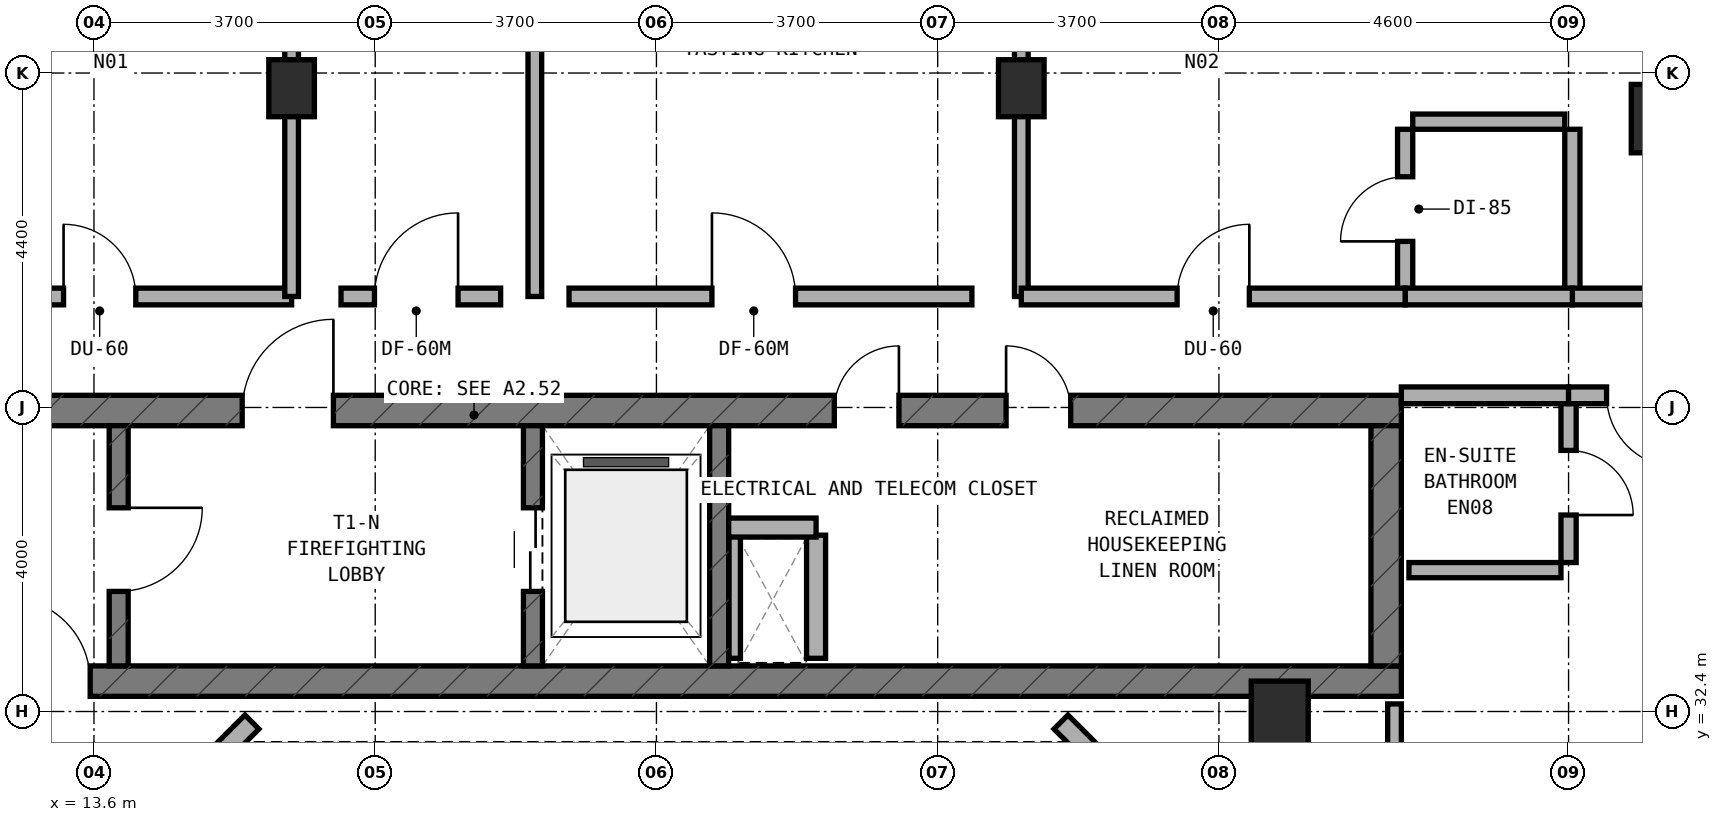
"""IFC4 building model, lengths in metres.
Left out: names, types, materials, properties, quantities, classifications, styles, units other than length and angle.
Written with IfcOpenShell. Run it as: python <this file> out.ifc"""

import sys

from ifc_helpers import new_model, si_unit, direction, frame, frame_2d, origin, origin_2d, place, context, subcontext, project, spatial, rectangle, extrude, element, fill, save


model = new_model("IFC4")
c1 = context("Model", 3, precision=1e-05, world=origin(), true_north=direction((0.0, 1.0)))
c2 = subcontext(c1, "Body", "Model", "MODEL_VIEW")
j1 = project(units=[si_unit("LENGTHUNIT", "METRE"), si_unit("PLANEANGLEUNIT", "RADIAN")], contexts=[c1])
p1 = place(None, origin())
s1 = spatial("IfcSite", under=j1, at=p1, CompositionType="ELEMENT")
p2 = place(p1, origin())
s2 = spatial("IfcBuilding", under=s1, at=p2, CompositionType="ELEMENT")
p3 = place(p2, frame((0.0, 0.0, 243.2)))
s3 = spatial("IfcBuildingStorey", under=s2, at=p3, CompositionType="ELEMENT", Elevation=243.2)
p4 = place(p3, frame((6.4, 32.8, 0.0), z_axis=(0.0, 0.0, 1.0), x_axis=(1.0, 0.0, 0.0)))
e1 = element("IfcWall", 1, at=p4, inside=s3, PredefinedType="SHEAR", context=c2, shape_type="SweptSolid", body=[
    extrude(rectangle(XDim=24.4, YDim=0.4, at=frame_2d((12.2, 0.0))), origin(), (0.0, 0.0, 1.0), 3.6),
])
p5 = place(p4, frame((6.05, 0.0, 0.0)))
e2 = element("IfcOpeningElement", 2, at=p5, cuts=e1, PredefinedType="OPENING", context=c2, shape_type="SweptSolid", body=[
    extrude(rectangle(XDim=1.1, YDim=2.15, at=frame_2d((0.55, 1.075))), frame((0.0, 0.21, 0.0), z_axis=(0.0, -1.0, 0.0), x_axis=(1.0, 0.0, 0.0)), (0.0, 0.0, 1.0), 0.42),
])
p6 = place(p3, frame((6.4, 36.36, 0.0), z_axis=(0.0, 0.0, 1.0), x_axis=(1.0, 0.0, 0.0)))
e3 = element("IfcWall", 3, at=p6, inside=s3, PredefinedType="SHEAR", context=c2, shape_type="SweptSolid", body=[
    extrude(rectangle(XDim=24.4, YDim=0.4, at=frame_2d((12.2, 0.0))), origin(), (0.0, 0.0, 1.0), 3.6),
])
p7 = place(p6, frame((9.15, 0.0, 0.0)))
e4 = element("IfcOpeningElement", 4, at=p7, cuts=e3, PredefinedType="OPENING", context=c2, shape_type="SweptSolid", body=[
    extrude(rectangle(XDim=1.2, YDim=2.15, at=frame_2d((0.6, 1.075))), frame((0.0, 0.21, 0.0), z_axis=(0.0, -1.0, 0.0), x_axis=(1.0, 0.0, 0.0)), (0.0, 0.0, 1.0), 0.42),
])
p8 = place(p6, frame((19.2, 0.0, 0.0)))
e5 = element("IfcOpeningElement", 5, at=p8, cuts=e3, PredefinedType="OPENING", context=c2, shape_type="SweptSolid", body=[
    extrude(rectangle(XDim=0.85, YDim=2.1, at=frame_2d((0.425, 1.05))), frame((0.0, 0.21, 0.0), z_axis=(0.0, -1.0, 0.0), x_axis=(1.0, 0.0, 0.0)), (0.0, 0.0, 1.0), 0.42),
])
p9 = place(p6, frame((16.94, 0.0, 0.0)))
e6 = element("IfcOpeningElement", 6, at=p9, cuts=e3, PredefinedType="OPENING", context=c2, shape_type="SweptSolid", body=[
    extrude(rectangle(XDim=0.85, YDim=2.1, at=frame_2d((0.425, 1.05))), frame((0.0, 0.21, 0.0), z_axis=(0.0, -1.0, 0.0), x_axis=(1.0, 0.0, 0.0)), (0.0, 0.0, 1.0), 0.42),
])
p10 = place(p3, frame((30.6, 33.0, 0.0), z_axis=(0.0, 0.0, 1.0), x_axis=(0.0, 1.0, 0.0)))
e7 = element("IfcWall", 7, at=p10, inside=s3, PredefinedType="SHEAR", context=c2, shape_type="SweptSolid", body=[
    extrude(rectangle(XDim=3.16, YDim=0.4, at=frame_2d((1.58, 0.0))), origin(), (0.0, 0.0, 1.0), 3.6),
])
p11 = place(p3, frame((13.925, 33.0, 0.0), z_axis=(0.0, 0.0, 1.0), x_axis=(0.0, 1.0, 0.0)))
e8 = element("IfcWall", 8, at=p11, inside=s3, PredefinedType="STANDARD", context=c2, shape_type="SweptSolid", body=[
    extrude(rectangle(XDim=3.16, YDim=0.25, at=frame_2d((1.58, 0.0))), origin(), (0.0, 0.0, 1.0), 3.32),
])
p12 = place(p11, frame((0.98, 0.0, 0.0)))
e9 = element("IfcOpeningElement", 9, at=p12, cuts=e8, PredefinedType="OPENING", context=c2, shape_type="SweptSolid", body=[
    extrude(rectangle(XDim=1.1, YDim=2.15, at=frame_2d((0.55, 1.075))), frame((0.0, 0.135, 0.0), z_axis=(0.0, -1.0, 0.0), x_axis=(1.0, 0.0, 0.0)), (0.0, 0.0, 1.0), 0.27),
])
p13 = place(p3, frame((19.375, 33.0, 0.0), z_axis=(0.0, 0.0, 1.0), x_axis=(0.0, 1.0, 0.0)))
e10 = element("IfcWall", 10, at=p13, inside=s3, PredefinedType="STANDARD", context=c2, shape_type="SweptSolid", body=[
    extrude(rectangle(XDim=3.16, YDim=0.25, at=frame_2d((1.58, 0.0))), origin(), (0.0, 0.0, 1.0), 3.32),
])
p14 = place(p13, frame((0.98, 0.0, 0.0)))
e11 = element("IfcOpeningElement", 11, at=p14, cuts=e10, PredefinedType="OPENING", context=c2, shape_type="SweptSolid", body=[
    extrude(rectangle(XDim=1.1, YDim=2.15, at=frame_2d((0.55, 1.075))), frame((0.0, 0.135, 0.0), z_axis=(0.0, -1.0, 0.0), x_axis=(1.0, 0.0, 0.0)), (0.0, 0.0, 1.0), 0.27),
])
p15 = place(p3, frame((21.825, 33.0, 0.0), z_axis=(0.0, 0.0, 1.0), x_axis=(0.0, 1.0, 0.0)))
e12 = element("IfcWall", 12, at=p15, inside=s3, PredefinedType="STANDARD", context=c2, shape_type="SweptSolid", body=[
    extrude(rectangle(XDim=3.16, YDim=0.25, at=frame_2d((1.58, 0.0))), origin(), (0.0, 0.0, 1.0), 3.32),
])
for number, where, z_axis, x_axis in (
    (13, (16.2, 40.6, 0.0), (0.0, 0.0, 1.0), (1.0, 0.0, 0.0)),
    (14, (25.8, 40.6, 0.0), (0.0, 0.0, 1.0), (1.0, 0.0, 0.0)),
):
    element("IfcColumn", number, at=place(p3, frame(where, z_axis=z_axis, x_axis=x_axis)), inside=s3, PredefinedType="COLUMN", context=c2, shape_type="SweptSolid", body=[
        extrude(rectangle(XDim=0.6, YDim=0.75, at=origin_2d()), origin(), (0.0, 0.0, 1.0), 3.6),
    ])
for number, where, z_axis, x_axis in (
    (15, (34.2, 40.2, 0.0), (0.0, 0.0, 1.0), (1.0, 0.0, 0.0)),
    (16, (29.2, 32.35, 0.0), (0.0, 0.0, 1.0), (1.0, 0.0, 0.0)),
):
    element("IfcColumn", number, at=place(p3, frame(where, z_axis=z_axis, x_axis=x_axis)), inside=s3, PredefinedType="COLUMN", context=c2, shape_type="SweptSolid", body=[
        extrude(rectangle(XDim=0.75, YDim=0.9, at=origin_2d()), origin(), (0.0, 0.0, 1.0), 3.6),
    ])
for number, where, z_axis, x_axis in (
    (17, (28.156, 30.428, 0.0), (0.0, 0.0, 1.0), (-0.707, 0.707, 0.0)),
    (18, (15.678, 32.262, 0.0), (0.0, 0.0, 1.0), (-0.707, -0.707, 0.0)),
):
    element("IfcWall", number, at=place(p3, frame(where, z_axis=z_axis, x_axis=x_axis)), inside=s3, PredefinedType="STANDARD", context=c2, shape_type="SweptSolid", body=[
        extrude(rectangle(XDim=2.594, YDim=0.26, at=frame_2d((1.297, 0.0))), origin(), (0.0, 0.0, 1.0), 3.32),
    ])
p16 = place(p3, frame((22.03, 33.1, 0.0), z_axis=(0.0, 0.0, 1.0), x_axis=(0.0, 1.0, 0.0)))
e19 = element("IfcWall", 19, at=p16, inside=s3, PredefinedType="PARTITIONING", context=c2, shape_type="SweptSolid", body=[
    extrude(rectangle(XDim=1.62, YDim=0.15, at=frame_2d((0.81, 0.0))), origin(), (0.0, 0.0, 1.0), 3.32),
])
p17 = place(p3, frame((23.1, 33.1, 0.0), z_axis=(0.0, 0.0, 1.0), x_axis=(0.0, 1.0, 0.0)))
e20 = element("IfcWall", 20, at=p17, inside=s3, PredefinedType="SOLIDWALL", context=c2, shape_type="SweptSolid", body=[
    extrude(rectangle(XDim=1.62, YDim=0.25, at=frame_2d((0.81, 0.0))), origin(), (0.0, 0.0, 1.0), 3.32),
])
p18 = place(p3, frame((21.95, 34.82, 0.0), z_axis=(0.0, 0.0, 1.0), x_axis=(1.0, 0.0, 0.0)))
e21 = element("IfcWall", 21, at=p18, inside=s3, PredefinedType="SOLIDWALL", context=c2, shape_type="SweptSolid", body=[
    extrude(rectangle(XDim=1.15, YDim=0.25, at=frame_2d((0.575, 0.0))), origin(), (0.0, 0.0, 1.0), 3.32),
])
p19 = place(p3, frame((11.15, 37.86, 0.0), z_axis=(0.0, 0.0, 1.0), x_axis=(1.0, 0.0, 0.0)))
e22 = element("IfcWall", 22, at=p19, inside=s3, PredefinedType="SOLIDWALL", context=c2, shape_type="SweptSolid", body=[
    extrude(rectangle(XDim=5.05, YDim=0.22, at=frame_2d((2.525, 0.0))), origin(), (0.0, 0.0, 1.0), 2.745),
])
p20 = place(p19, frame((2.05, 0.0, 0.0)))
e23 = element("IfcOpeningElement", 23, at=p20, cuts=e22, PredefinedType="OPENING", context=c2, shape_type="SweptSolid", body=[
    extrude(rectangle(XDim=0.95, YDim=2.1, at=frame_2d((0.475, 1.05))), frame((0.0, 0.12, 0.0), z_axis=(0.0, -1.0, 0.0), x_axis=(1.0, 0.0, 0.0)), (0.0, 0.0, 1.0), 0.24),
])
p21 = place(p3, frame((16.2, 37.86, 0.0), z_axis=(0.0, 0.0, 1.0), x_axis=(0.0, 1.0, 0.0)))
e24 = element("IfcWall", 24, at=p21, inside=s3, PredefinedType="SOLIDWALL", context=c2, shape_type="SweptSolid", body=[
    extrude(rectangle(XDim=5.68, YDim=0.18, at=frame_2d((2.84, 0.0))), origin(), (0.0, 0.0, 1.0), 2.745),
])
p22 = place(p3, frame((19.4, 37.86, 0.0), z_axis=(0.0, 0.0, 1.0), x_axis=(0.0, 1.0, 0.0)))
e25 = element("IfcWall", 25, at=p22, inside=s3, PredefinedType="SOLIDWALL", context=c2, shape_type="SweptSolid", body=[
    extrude(rectangle(XDim=5.68, YDim=0.18, at=frame_2d((2.84, 0.0))), origin(), (0.0, 0.0, 1.0), 2.995),
])
p23 = place(p3, frame((16.85, 37.86, 0.0), z_axis=(0.0, 0.0, 1.0), x_axis=(1.0, 0.0, 0.0)))
e26 = element("IfcWall", 26, at=p23, inside=s3, PredefinedType="SOLIDWALL", context=c2, shape_type="SweptSolid", body=[
    extrude(rectangle(XDim=2.1, YDim=0.22, at=frame_2d((1.05, 0.0))), origin(), (0.0, 0.0, 1.0), 3.32),
])
p24 = place(p23, frame((0.44, 0.0, 0.0)))
e27 = element("IfcOpeningElement", 27, at=p24, cuts=e26, PredefinedType="OPENING", context=c2, shape_type="SweptSolid", body=[
    extrude(rectangle(XDim=1.1, YDim=2.1, at=frame_2d((0.55, 1.05))), frame((0.0, 0.12, 0.0), z_axis=(0.0, -1.0, 0.0), x_axis=(1.0, 0.0, 0.0)), (0.0, 0.0, 1.0), 0.24),
])
p25 = place(p3, frame((19.85, 37.86, 0.0), z_axis=(0.0, 0.0, 1.0), x_axis=(1.0, 0.0, 0.0)))
e28 = element("IfcWall", 28, at=p25, inside=s3, PredefinedType="SOLIDWALL", context=c2, shape_type="SweptSolid", body=[
    extrude(rectangle(XDim=5.3, YDim=0.22, at=frame_2d((2.65, 0.0))), origin(), (0.0, 0.0, 1.0), 3.32),
])
p26 = place(p25, frame((1.88, 0.0, 0.0)))
e29 = element("IfcOpeningElement", 29, at=p26, cuts=e28, PredefinedType="OPENING", context=c2, shape_type="SweptSolid", body=[
    extrude(rectangle(XDim=1.1, YDim=2.1, at=frame_2d((0.55, 1.05))), frame((0.0, 0.12, 0.0), z_axis=(0.0, -1.0, 0.0), x_axis=(1.0, 0.0, 0.0)), (0.0, 0.0, 1.0), 0.24),
])
p27 = place(p3, frame((25.8, 37.86, 0.0), z_axis=(0.0, 0.0, 1.0), x_axis=(0.0, 1.0, 0.0)))
e30 = element("IfcWall", 30, at=p27, inside=s3, PredefinedType="SOLIDWALL", context=c2, shape_type="SweptSolid", body=[
    extrude(rectangle(XDim=5.68, YDim=0.18, at=frame_2d((2.84, 0.0))), origin(), (0.0, 0.0, 1.0), 2.745),
])
p28 = place(p3, frame((30.85, 37.96, 0.0), z_axis=(0.0, 0.0, 1.0), x_axis=(0.0, 1.0, 0.0)))
e31 = element("IfcWall", 31, at=p28, inside=s3, PredefinedType="PLUMBINGWALL", context=c2, shape_type="SweptSolid", body=[
    extrude(rectangle(XDim=2.1, YDim=0.2, at=frame_2d((1.05, 0.0))), origin(), (0.0, 0.0, 1.0), 2.995),
])
p29 = place(p28, frame((0.625, 0.0, 0.0)))
e32 = element("IfcOpeningElement", 32, at=p29, cuts=e31, PredefinedType="OPENING", context=c2, shape_type="SweptSolid", body=[
    extrude(rectangle(XDim=0.85, YDim=2.1, at=frame_2d((0.425, 1.05))), frame((0.0, 0.11, 0.0), z_axis=(0.0, -1.0, 0.0), x_axis=(1.0, 0.0, 0.0)), (0.0, 0.0, 1.0), 0.22),
])
p30 = place(p3, frame((30.95, 40.16, 0.0), z_axis=(0.0, 0.0, 1.0), x_axis=(1.0, 0.0, 0.0)))
e33 = element("IfcWall", 33, at=p30, inside=s3, PredefinedType="PLUMBINGWALL", context=c2, shape_type="SweptSolid", body=[
    extrude(rectangle(XDim=2.0, YDim=0.2, at=frame_2d((1.0, 0.0))), origin(), (0.0, 0.0, 1.0), 3.015),
])
p31 = place(p3, frame((33.05, 37.96, 0.0), z_axis=(0.0, 0.0, 1.0), x_axis=(0.0, 1.0, 0.0)))
e34 = element("IfcWall", 34, at=p31, inside=s3, PredefinedType="PLUMBINGWALL", context=c2, shape_type="SweptSolid", body=[
    extrude(rectangle(XDim=2.1, YDim=0.2, at=frame_2d((1.05, 0.0))), origin(), (0.0, 0.0, 1.0), 2.995),
])
p32 = place(p3, frame((33.05, 37.86, 0.0), z_axis=(0.0, 0.0, 1.0), x_axis=(1.0, 0.0, 0.0)))
e35 = element("IfcWall", 35, at=p32, inside=s3, PredefinedType="SOLIDWALL", context=c2, shape_type="SweptSolid", body=[
    extrude(rectangle(XDim=6.19, YDim=0.22, at=frame_2d((3.095, 0.0))), origin(), (0.0, 0.0, 1.0), 2.745),
])
p33 = place(p3, frame((30.85, 37.86, 0.0), z_axis=(0.0, 0.0, 1.0), x_axis=(1.0, 0.0, 0.0)))
e36 = element("IfcWall", 36, at=p33, inside=s3, PredefinedType="SOLIDWALL", context=c2, shape_type="SweptSolid", body=[
    extrude(rectangle(XDim=2.2, YDim=0.22, at=frame_2d((1.1, 0.0))), origin(), (0.0, 0.0, 1.0), 3.32),
])
p34 = place(p3, frame((25.8, 37.86, 0.0), z_axis=(0.0, 0.0, 1.0), x_axis=(1.0, 0.0, 0.0)))
e37 = element("IfcWall", 37, at=p34, inside=s3, PredefinedType="SOLIDWALL", context=c2, shape_type="SweptSolid", body=[
    extrude(rectangle(XDim=5.05, YDim=0.22, at=frame_2d((2.525, 0.0))), origin(), (0.0, 0.0, 1.0), 2.745),
])
p35 = place(p34, frame((2.05, 0.0, 0.0)))
e38 = element("IfcOpeningElement", 38, at=p35, cuts=e37, PredefinedType="OPENING", context=c2, shape_type="SweptSolid", body=[
    extrude(rectangle(XDim=0.95, YDim=2.1, at=frame_2d((0.475, 1.05))), frame((0.0, 0.12, 0.0), z_axis=(0.0, -1.0, 0.0), x_axis=(1.0, 0.0, 0.0)), (0.0, 0.0, 1.0), 0.24),
])
p36 = place(p3, frame((30.71, 17.5, 0.0), z_axis=(0.0, 0.0, 1.0), x_axis=(0.0, 1.0, 0.0)))
e39 = element("IfcWall", 39, at=p36, inside=s3, PredefinedType="SOLIDWALL", context=c2, shape_type="SweptSolid", body=[
    extrude(rectangle(XDim=15.0, YDim=0.18, at=frame_2d((7.5, 0.0))), origin(), (0.0, 0.0, 1.0), 2.745),
])
p37 = place(p3, frame((33.0, 34.36, 0.0), z_axis=(0.0, 0.0, 1.0), x_axis=(0.0, 1.0, 0.0)))
e40 = element("IfcWall", 40, at=p37, inside=s3, PredefinedType="PLUMBINGWALL", context=c2, shape_type="SweptSolid", body=[
    extrude(rectangle(XDim=2.1, YDim=0.2, at=frame_2d((1.05, 0.0))), origin(), (0.0, 0.0, 1.0), 3.32),
])
p38 = place(p37, frame((0.625, 0.0, 0.0)))
e41 = element("IfcOpeningElement", 41, at=p38, cuts=e40, PredefinedType="OPENING", context=c2, shape_type="SweptSolid", body=[
    extrude(rectangle(XDim=0.85, YDim=2.1, at=frame_2d((0.425, 1.05))), frame((0.0, 0.11, 0.0), z_axis=(0.0, -1.0, 0.0), x_axis=(1.0, 0.0, 0.0)), (0.0, 0.0, 1.0), 0.22),
])
p39 = place(p3, frame((30.9, 34.26, 0.0), z_axis=(0.0, 0.0, 1.0), x_axis=(1.0, 0.0, 0.0)))
e42 = element("IfcWall", 42, at=p39, inside=s3, PredefinedType="PLUMBINGWALL", context=c2, shape_type="SweptSolid", body=[
    extrude(rectangle(XDim=2.0, YDim=0.2, at=frame_2d((1.0, 0.0))), origin(), (0.0, 0.0, 1.0), 3.32),
])
p40 = place(p3, frame((30.8, 36.56, 0.0), z_axis=(0.0, 0.0, 1.0), x_axis=(1.0, 0.0, 0.0)))
e43 = element("IfcWall", 43, at=p40, inside=s3, PredefinedType="SOLIDWALL", context=c2, shape_type="SweptSolid", body=[
    extrude(rectangle(XDim=2.2, YDim=0.22, at=frame_2d((1.1, 0.0))), origin(), (0.0, 0.0, 1.0), 3.32),
])
p41 = place(p3, frame((33.0, 36.56, 0.0), z_axis=(0.0, 0.0, 1.0), x_axis=(1.0, 0.0, 0.0)))
e44 = element("IfcWall", 44, at=p41, inside=s3, PredefinedType="SOLIDWALL", context=c2, shape_type="SweptSolid", body=[
    extrude(rectangle(XDim=6.4, YDim=0.22, at=frame_2d((3.2, 0.0))), origin(), (0.0, 0.0, 1.0), 2.745),
])
p42 = place(p41, frame((0.5, 0.0, 0.0)))
e45 = element("IfcOpeningElement", 45, at=p42, cuts=e44, PredefinedType="OPENING", context=c2, shape_type="SweptSolid", body=[
    extrude(rectangle(XDim=0.95, YDim=2.1, at=frame_2d((0.475, 1.05))), frame((0.0, 0.12, 0.0), z_axis=(0.0, -1.0, 0.0), x_axis=(1.0, 0.0, 0.0)), (0.0, 0.0, 1.0), 0.24),
])
p43 = place(p12, frame((1.1, 0.0, 0.0), z_axis=(0.0, 0.0, 1.0), x_axis=(-1.0, 0.0, 0.0)))
e46 = element("IfcDoor", 46, at=p43, inside=s3, OperationType="SINGLE_SWING_LEFT", PredefinedType="DOOR", context=c2, shape_type="SweptSolid", body=[
    extrude(rectangle(XDim=1.1, YDim=2.15, at=frame_2d((0.55, 1.075))), frame((0.0, 0.025, 0.0), z_axis=(0.0, -1.0, 0.0), x_axis=(1.0, 0.0, 0.0)), (0.0, 0.0, 1.0), 0.05),
])
fill(e9, e46)
p44 = place(p7, origin())
e47 = element("IfcDoor", 47, at=p44, inside=s3, OperationType="SINGLE_SWING_RIGHT", PredefinedType="DOOR", context=c2, shape_type="SweptSolid", body=[
    extrude(rectangle(XDim=1.2, YDim=2.15, at=frame_2d((0.6, 1.075))), frame((0.0, 0.025, 0.0), z_axis=(0.0, -1.0, 0.0), x_axis=(1.0, 0.0, 0.0)), (0.0, 0.0, 1.0), 0.05),
])
fill(e4, e47)
p45 = place(p14, origin())
e48 = element("IfcDoor", 48, at=p45, inside=s3, OperationType="DOUBLE_DOOR_SLIDING", PredefinedType="DOOR", context=c2, shape_type="SweptSolid", body=[
    extrude(rectangle(XDim=1.1, YDim=2.15, at=frame_2d((0.55, 1.075))), frame((0.0, 0.025, 0.0), z_axis=(0.0, -1.0, 0.0), x_axis=(1.0, 0.0, 0.0)), (0.0, 0.0, 1.0), 0.05),
])
fill(e11, e48)
p46 = place(p8, origin())
e49 = element("IfcDoor", 49, at=p46, inside=s3, OperationType="SINGLE_SWING_LEFT", PredefinedType="DOOR", context=c2, shape_type="SweptSolid", body=[
    extrude(rectangle(XDim=0.85, YDim=2.1, at=frame_2d((0.425, 1.05))), frame((0.0, 0.025, 0.0), z_axis=(0.0, -1.0, 0.0), x_axis=(1.0, 0.0, 0.0)), (0.0, 0.0, 1.0), 0.05),
])
fill(e5, e49)
p47 = place(p9, origin())
e50 = element("IfcDoor", 50, at=p47, inside=s3, OperationType="SINGLE_SWING_RIGHT", PredefinedType="DOOR", context=c2, shape_type="SweptSolid", body=[
    extrude(rectangle(XDim=0.85, YDim=2.1, at=frame_2d((0.425, 1.05))), frame((0.0, 0.025, 0.0), z_axis=(0.0, -1.0, 0.0), x_axis=(1.0, 0.0, 0.0)), (0.0, 0.0, 1.0), 0.05),
])
fill(e6, e50)
p48 = place(p5, origin())
e51 = element("IfcDoor", 51, at=p48, inside=s3, OperationType="SINGLE_SWING_LEFT", PredefinedType="DOOR", context=c2, shape_type="SweptSolid", body=[
    extrude(rectangle(XDim=1.1, YDim=2.15, at=frame_2d((0.55, 1.075))), frame((0.0, 0.025, 0.0), z_axis=(0.0, -1.0, 0.0), x_axis=(1.0, 0.0, 0.0)), (0.0, 0.0, 1.0), 0.05),
])
fill(e2, e51)
p49 = place(p20, origin())
e52 = element("IfcDoor", 52, at=p49, inside=s3, OperationType="SINGLE_SWING_LEFT", PredefinedType="DOOR", context=c2, shape_type="SweptSolid", body=[
    extrude(rectangle(XDim=0.95, YDim=2.1, at=frame_2d((0.475, 1.05))), frame((0.0, 0.025, 0.0), z_axis=(0.0, -1.0, 0.0), x_axis=(1.0, 0.0, 0.0)), (0.0, 0.0, 1.0), 0.05),
])
fill(e23, e52)
p50 = place(p24, origin())
e53 = element("IfcDoor", 53, at=p50, inside=s3, OperationType="SINGLE_SWING_RIGHT", PredefinedType="DOOR", context=c2, shape_type="SweptSolid", body=[
    extrude(rectangle(XDim=1.1, YDim=2.1, at=frame_2d((0.55, 1.05))), frame((0.0, 0.025, 0.0), z_axis=(0.0, -1.0, 0.0), x_axis=(1.0, 0.0, 0.0)), (0.0, 0.0, 1.0), 0.05),
])
fill(e27, e53)
p51 = place(p26, origin())
e54 = element("IfcDoor", 54, at=p51, inside=s3, OperationType="SINGLE_SWING_LEFT", PredefinedType="DOOR", context=c2, shape_type="SweptSolid", body=[
    extrude(rectangle(XDim=1.1, YDim=2.1, at=frame_2d((0.55, 1.05))), frame((0.0, 0.025, 0.0), z_axis=(0.0, -1.0, 0.0), x_axis=(1.0, 0.0, 0.0)), (0.0, 0.0, 1.0), 0.05),
])
fill(e29, e54)
p52 = place(p29, origin())
e55 = element("IfcDoor", 55, at=p52, inside=s3, OperationType="SINGLE_SWING_LEFT", PredefinedType="DOOR", context=c2, shape_type="SweptSolid", body=[
    extrude(rectangle(XDim=0.85, YDim=2.1, at=frame_2d((0.425, 1.05))), frame((0.0, 0.025, 0.0), z_axis=(0.0, -1.0, 0.0), x_axis=(1.0, 0.0, 0.0)), (0.0, 0.0, 1.0), 0.05),
])
fill(e32, e55)
p53 = place(p35, origin())
e56 = element("IfcDoor", 56, at=p53, inside=s3, OperationType="SINGLE_SWING_RIGHT", PredefinedType="DOOR", context=c2, shape_type="SweptSolid", body=[
    extrude(rectangle(XDim=0.95, YDim=2.1, at=frame_2d((0.475, 1.05))), frame((0.0, 0.025, 0.0), z_axis=(0.0, -1.0, 0.0), x_axis=(1.0, 0.0, 0.0)), (0.0, 0.0, 1.0), 0.05),
])
fill(e38, e56)
p54 = place(p38, frame((0.85, 0.0, 0.0), z_axis=(0.0, 0.0, 1.0), x_axis=(-1.0, 0.0, 0.0)))
e57 = element("IfcDoor", 57, at=p54, inside=s3, OperationType="SINGLE_SWING_RIGHT", PredefinedType="DOOR", context=c2, shape_type="SweptSolid", body=[
    extrude(rectangle(XDim=0.85, YDim=2.1, at=frame_2d((0.425, 1.05))), frame((0.0, 0.025, 0.0), z_axis=(0.0, -1.0, 0.0), x_axis=(1.0, 0.0, 0.0)), (0.0, 0.0, 1.0), 0.05),
])
fill(e41, e57)
p55 = place(p42, frame((0.95, 0.0, 0.0), z_axis=(0.0, 0.0, 1.0), x_axis=(-1.0, 0.0, 0.0)))
e58 = element("IfcDoor", 58, at=p55, inside=s3, OperationType="SINGLE_SWING_LEFT", PredefinedType="DOOR", context=c2, shape_type="SweptSolid", body=[
    extrude(rectangle(XDim=0.95, YDim=2.1, at=frame_2d((0.475, 1.05))), frame((0.0, 0.025, 0.0), z_axis=(0.0, -1.0, 0.0), x_axis=(1.0, 0.0, 0.0)), (0.0, 0.0, 1.0), 0.05),
])
fill(e45, e58)
save(model, sys.argv[1])
